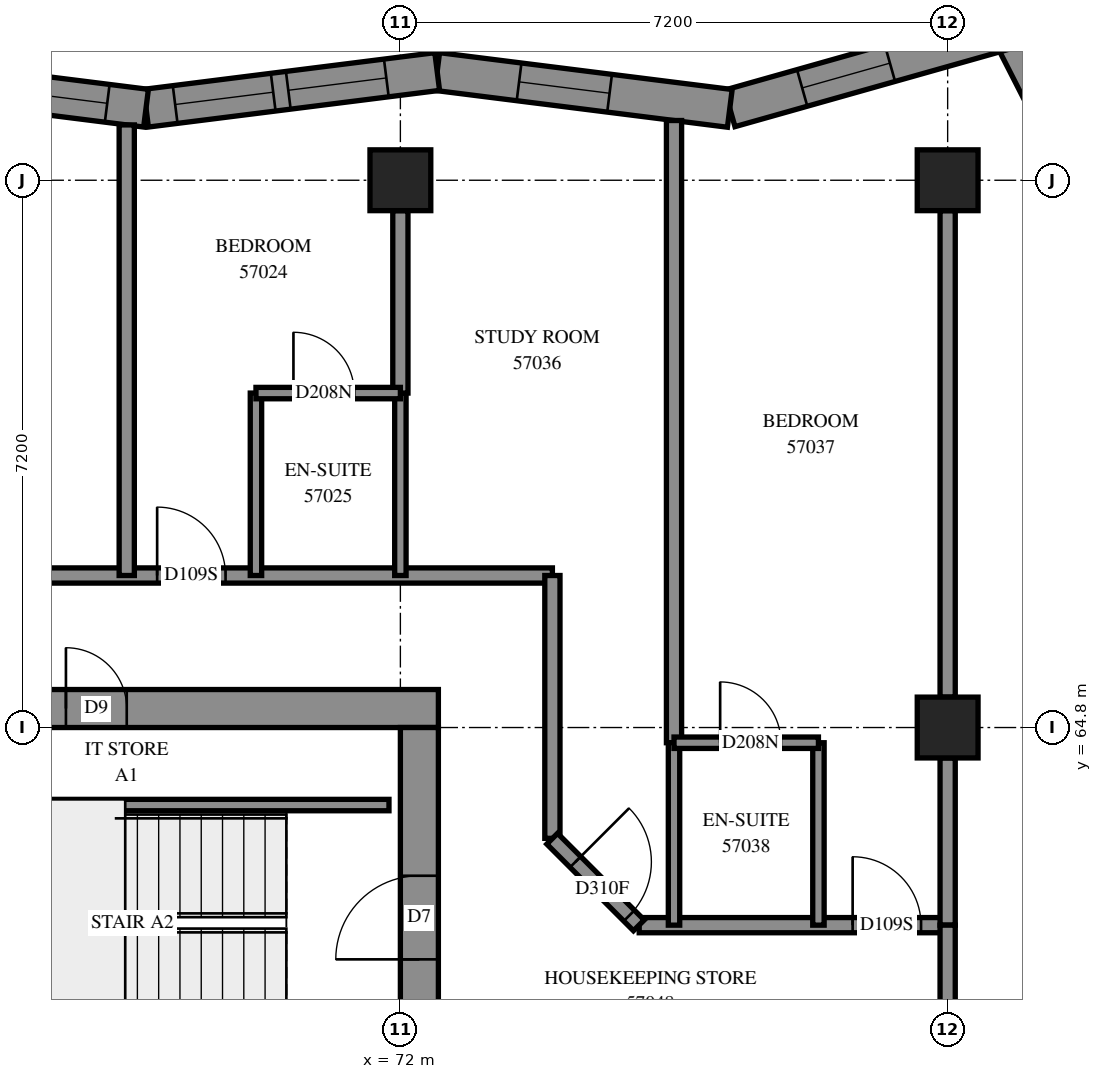
"""IFC4 building model, lengths in metres.
Left out: names, types, materials, properties, quantities, classifications, styles, units other than length and angle.
Written with IfcOpenShell. Run it as: python <this file> out.ifc"""

import sys

from ifc_helpers import new_model, si_unit, direction, frame, frame_2d, origin, origin_2d, place, context, subcontext, project, spatial, polyline, rectangle, outline, extrude, element, fill, save


model = new_model("IFC4")
c1 = context("Model", 3, precision=1e-05, world=origin(), true_north=direction((0.0, 1.0)))
c2 = subcontext(c1, "Body", "Model", "MODEL_VIEW")
j1 = project(units=[si_unit("LENGTHUNIT", "METRE"), si_unit("PLANEANGLEUNIT", "RADIAN")], contexts=[c1])
p1 = place(None, origin())
s1 = spatial("IfcSite", under=j1, at=p1, CompositionType="ELEMENT")
p2 = place(p1, origin())
s2 = spatial("IfcBuilding", under=s1, at=p2, CompositionType="ELEMENT")
p3 = place(p2, frame((0.0, 0.0, 210.0)))
s3 = spatial("IfcBuildingStorey", under=s2, at=p3, CompositionType="ELEMENT", Elevation=210.0)
for number, where, z_axis, x_axis in (
    (1, (72.0, 72.0, 0.0), (0.0, 0.0, 1.0), (1.0, 0.0, 0.0)),
    (2, (79.2, 64.8, 0.0), (0.0, 0.0, 1.0), (1.0, 0.0, 0.0)),
    (3, (79.2, 72.0, 0.0), (0.0, 0.0, 1.0), (1.0, 0.0, 0.0)),
):
    element("IfcColumn", number, at=place(p3, frame(where, z_axis=z_axis, x_axis=x_axis)), inside=s3, PredefinedType="COLUMN", context=c2, shape_type="SweptSolid", body=[
        extrude(rectangle(XDim=0.8, YDim=0.8, at=origin_2d()), origin(), (0.0, 0.0, 1.0), 3.1),
    ])
p4 = place(p3, frame((57.1, 65.05, -0.3), z_axis=(0.0, 0.0, 1.0), x_axis=(1.0, 0.0, 0.0)))
e4 = element("IfcWall", 4, at=p4, inside=s3, PredefinedType="SHEAR", context=c2, shape_type="SweptSolid", body=[
    extrude(rectangle(XDim=15.4, YDim=0.5, at=frame_2d((7.7, 0.0))), origin(), (0.0, 0.0, 1.0), 2.7),
])
p5 = place(p4, frame((10.5, 0.0, 0.3)))
e5 = element("IfcOpeningElement", 5, at=p5, cuts=e4, PredefinedType="OPENING", context=c2, shape_type="SweptSolid", body=[
    extrude(rectangle(XDim=0.8, YDim=2.1, at=frame_2d((0.4, 1.05))), frame((0.0, 0.26, 0.0), z_axis=(0.0, -1.0, 0.0), x_axis=(1.0, 0.0, 0.0)), (0.0, 0.0, 1.0), 0.52),
])
p6 = place(p3, frame((72.25, 50.4, -0.3), z_axis=(0.0, 0.0, 1.0), x_axis=(0.0, 1.0, 0.0)))
e6 = element("IfcWall", 6, at=p6, inside=s3, PredefinedType="SHEAR", context=c2, shape_type="SweptSolid", body=[
    extrude(rectangle(XDim=14.4, YDim=0.5, at=frame_2d((7.2, 0.0))), origin(), (0.0, 0.0, 1.0), 2.7),
])
p7 = place(p6, frame((4.55, 0.0, 0.3)))
e7 = element("IfcOpeningElement", 7, at=p7, cuts=e6, PredefinedType="OPENING", context=c2, shape_type="SweptSolid", body=[
    extrude(rectangle(XDim=1.1, YDim=2.1, at=frame_2d((0.55, 1.05))), frame((0.0, 0.26, 0.0), z_axis=(0.0, -1.0, 0.0), x_axis=(1.0, 0.0, 0.0)), (0.0, 0.0, 1.0), 0.52),
])
p8 = place(p6, frame((11.35, 0.0, 0.3)))
e8 = element("IfcOpeningElement", 8, at=p8, cuts=e6, PredefinedType="OPENING", context=c2, shape_type="SweptSolid", body=[
    extrude(rectangle(XDim=1.1, YDim=2.1, at=frame_2d((0.55, 1.05))), frame((0.0, 0.26, 0.0), z_axis=(0.0, -1.0, 0.0), x_axis=(1.0, 0.0, 0.0)), (0.0, 0.0, 1.0), 0.52),
])
p9 = place(p3, frame((81.542, 70.994, 0.0), z_axis=(0.0, 0.0, 1.0), x_axis=(-0.4543449851, 0.8908258161, 0.0)))
e9 = element("IfcWall", 9, at=p9, inside=s3, PredefinedType="SOLIDWALL", context=c2, shape_type="SweptSolid", body=[
    extrude(outline(polyline([(0.058, -0.25), (3.564, -0.25), (3.154, 0.25), (-0.058, 0.25), (0.058, -0.25)])), origin(), (0.0, 0.0, 1.0), 3.1),
])
p10 = place(p9, frame((0.745, 0.0, 0.45)))
e10 = element("IfcOpeningElement", 10, at=p10, cuts=e9, PredefinedType="OPENING", context=c2, shape_type="SweptSolid", body=[
    extrude(rectangle(XDim=1.2, YDim=2.5, at=frame_2d((0.6, 1.25))), frame((0.0, 0.26, 0.0), z_axis=(0.0, -1.0, 0.0), x_axis=(1.0, 0.0, 0.0)), (0.0, 0.0, 1.0), 0.52),
])
p11 = place(p3, frame((80.016, 73.986, 0.0), z_axis=(0.0, 0.0, 1.0), x_axis=(-0.9623461237, -0.2718270373, 0.0)))
e11 = element("IfcWall", 11, at=p11, inside=s3, PredefinedType="SOLIDWALL", context=c2, shape_type="SweptSolid", body=[
    extrude(outline(polyline([(-0.205, -0.25), (3.775, -0.25), (3.877, 0.25), (0.205, 0.25), (-0.205, -0.25)])), origin(), (0.0, 0.0, 1.0), 3.1),
])
p12 = place(p11, frame((1.637, 0.0, 0.45)))
e12 = element("IfcOpeningElement", 12, at=p12, cuts=e11, PredefinedType="OPENING", context=c2, shape_type="SweptSolid", body=[
    extrude(rectangle(XDim=1.2, YDim=2.5, at=frame_2d((0.6, 1.25))), frame((0.0, 0.26, 0.0), z_axis=(0.0, -1.0, 0.0), x_axis=(1.0, 0.0, 0.0)), (0.0, 0.0, 1.0), 0.52),
])
p13 = place(p3, frame((76.334, 72.946, 0.0), z_axis=(0.0, 0.0, 1.0), x_axis=(-0.9921764383, 0.1248435636, 0.0)))
e13 = element("IfcWall", 13, at=p13, inside=s3, PredefinedType="SOLIDWALL", context=c2, shape_type="SweptSolid", body=[
    extrude(outline(polyline([(0.051, -0.25), (3.912, -0.25), (3.849, 0.25), (-0.051, 0.25), (0.051, -0.25)])), origin(), (0.0, 0.0, 1.0), 3.1),
])
p14 = place(p13, frame((1.594, 0.0, 0.45)))
e14 = element("IfcOpeningElement", 14, at=p14, cuts=e13, PredefinedType="OPENING", context=c2, shape_type="SweptSolid", body=[
    extrude(rectangle(XDim=1.2, YDim=2.5, at=frame_2d((0.6, 1.25))), frame((0.0, 0.26, 0.0), z_axis=(0.0, -1.0, 0.0), x_axis=(1.0, 0.0, 0.0)), (0.0, 0.0, 1.0), 0.52),
])
p15 = place(p3, frame((72.484, 73.43, 0.0), z_axis=(0.0, 0.0, 1.0), x_axis=(-0.9921759282, -0.1248476171, 0.0)))
e15 = element("IfcWall", 15, at=p15, inside=s3, PredefinedType="SOLIDWALL", context=c2, shape_type="SweptSolid", body=[
    extrude(outline(polyline([(-0.032, -0.25), (3.829, -0.25), (3.892, 0.25), (0.032, 0.25), (-0.032, -0.25)])), origin(), (0.0, 0.0, 1.0), 3.1),
])
p16 = place(p15, frame((0.674, 0.0, 0.45)))
e16 = element("IfcOpeningElement", 16, at=p16, cuts=e15, PredefinedType="OPENING", context=c2, shape_type="SweptSolid", body=[
    extrude(rectangle(XDim=1.3, YDim=2.5, at=frame_2d((0.65, 1.25))), frame((0.0, 0.26, 0.0), z_axis=(0.0, -1.0, 0.0), x_axis=(1.0, 0.0, 0.0)), (0.0, 0.0, 1.0), 0.52),
])
p17 = place(p15, frame((2.174, 0.0, 0.45)))
e17 = element("IfcOpeningElement", 17, at=p17, cuts=e15, PredefinedType="OPENING", context=c2, shape_type="SweptSolid", body=[
    extrude(rectangle(XDim=1.3, YDim=2.5, at=frame_2d((0.65, 1.25))), frame((0.0, 0.26, 0.0), z_axis=(0.0, -1.0, 0.0), x_axis=(1.0, 0.0, 0.0)), (0.0, 0.0, 1.0), 0.52),
])
p18 = place(p3, frame((68.654, 72.948, 0.0), z_axis=(0.0, 0.0, 1.0), x_axis=(-0.9921759282, 0.1248476171, 0.0)))
e18 = element("IfcWall", 18, at=p18, inside=s3, PredefinedType="SOLIDWALL", context=c2, shape_type="SweptSolid", body=[
    extrude(outline(polyline([(0.032, -0.25), (3.892, -0.25), (3.829, 0.25), (-0.032, 0.25), (0.032, -0.25)])), origin(), (0.0, 0.0, 1.0), 3.1),
])
p19 = place(p18, frame((0.515, 0.0, 0.45)))
e19 = element("IfcOpeningElement", 19, at=p19, cuts=e18, PredefinedType="OPENING", context=c2, shape_type="SweptSolid", body=[
    extrude(rectangle(XDim=1.3, YDim=2.5, at=frame_2d((0.65, 1.25))), frame((0.0, 0.26, 0.0), z_axis=(0.0, -1.0, 0.0), x_axis=(1.0, 0.0, 0.0)), (0.0, 0.0, 1.0), 0.52),
])
p20 = place(p18, frame((2.015, 0.0, 0.45)))
e20 = element("IfcOpeningElement", 20, at=p20, cuts=e18, PredefinedType="OPENING", context=c2, shape_type="SweptSolid", body=[
    extrude(rectangle(XDim=1.3, YDim=2.5, at=frame_2d((0.65, 1.25))), frame((0.0, 0.26, 0.0), z_axis=(0.0, -1.0, 0.0), x_axis=(1.0, 0.0, 0.0)), (0.0, 0.0, 1.0), 0.52),
])
p21 = place(p3, frame((64.95, 63.78, 0.0), z_axis=(0.0, 0.0, 1.0), x_axis=(1.0, 0.0, 0.0)))
e21 = element("IfcWall", 21, at=p21, inside=s3, PredefinedType="PARTITIONING", context=c2, shape_type="SweptSolid", body=[
    extrude(rectangle(XDim=6.9, YDim=0.15, at=frame_2d((3.45, 0.0))), origin(), (0.0, 0.0, 1.0), 3.1),
])
p22 = place(p3, frame((55.6, 66.8, 0.0), z_axis=(0.0, 0.0, 1.0), x_axis=(1.0, 0.0, 0.0)))
e22 = element("IfcWall", 22, at=p22, inside=s3, PredefinedType="PARTITIONING", context=c2, shape_type="SweptSolid", body=[
    extrude(rectangle(XDim=18.4, YDim=0.2, at=frame_2d((9.2, 0.0))), origin(), (0.0, 0.0, 1.0), 3.1),
])
p23 = place(p22, frame((4.25, 0.0, 0.0)))
e23 = element("IfcOpeningElement", 23, at=p23, cuts=e22, PredefinedType="OPENING", context=c2, shape_type="SweptSolid", body=[
    extrude(rectangle(XDim=0.9, YDim=2.1, at=frame_2d((0.45, 1.05))), frame((0.0, 0.11, 0.0), z_axis=(0.0, -1.0, 0.0), x_axis=(1.0, 0.0, 0.0)), (0.0, 0.0, 1.0), 0.22),
])
p24 = place(p22, frame((7.974, 0.0, 0.0)))
e24 = element("IfcOpeningElement", 24, at=p24, cuts=e22, PredefinedType="OPENING", context=c2, shape_type="SweptSolid", body=[
    extrude(rectangle(XDim=1.0, YDim=2.1, at=frame_2d((0.5, 1.05))), frame((0.0, 0.11, 0.0), z_axis=(0.0, -1.0, 0.0), x_axis=(1.0, 0.0, 0.0)), (0.0, 0.0, 1.0), 0.22),
])
p25 = place(p22, frame((13.2, 0.0, 0.0)))
e25 = element("IfcOpeningElement", 25, at=p25, cuts=e22, PredefinedType="OPENING", context=c2, shape_type="SweptSolid", body=[
    extrude(rectangle(XDim=0.9, YDim=2.1, at=frame_2d((0.45, 1.05))), frame((0.0, 0.11, 0.0), z_axis=(0.0, -1.0, 0.0), x_axis=(1.0, 0.0, 0.0)), (0.0, 0.0, 1.0), 0.22),
])
p26 = place(p3, frame((75.6, 64.6, 0.0), z_axis=(0.0, 0.0, 1.0), x_axis=(0.0, 1.0, 0.0)))
e26 = element("IfcWall", 26, at=p26, inside=s3, PredefinedType="PARTITIONING", context=c2, shape_type="SweptSolid", body=[
    extrude(rectangle(XDim=8.186, YDim=0.2, at=frame_2d((4.093, 0.0))), origin(), (0.0, 0.0, 1.0), 3.1),
])
p27 = place(p3, frame((79.2, 65.2, 0.0), z_axis=(0.0, 0.0, 1.0), x_axis=(0.0, 1.0, 0.0)))
e27 = element("IfcWall", 27, at=p27, inside=s3, PredefinedType="PARTITIONING", context=c2, shape_type="SweptSolid", body=[
    extrude(rectangle(XDim=6.4, YDim=0.2, at=frame_2d((3.2, 0.0))), origin(), (0.0, 0.0, 1.0), 3.1),
])
p28 = place(p3, frame((68.4, 66.8, 0.0), z_axis=(0.0, 0.0, 1.0), x_axis=(0.0, 1.0, 0.0)))
e28 = element("IfcWall", 28, at=p28, inside=s3, PredefinedType="PARTITIONING", context=c2, shape_type="SweptSolid", body=[
    extrude(rectangle(XDim=5.928, YDim=0.2, at=frame_2d((2.964, 0.0))), origin(), (0.0, 0.0, 1.0), 3.1),
])
p29 = place(p3, frame((75.142, 62.2, 0.0), z_axis=(0.0, 0.0, 1.0), x_axis=(1.0, 0.0, 0.0)))
e29 = element("IfcWall", 29, at=p29, inside=s3, PredefinedType="PARTITIONING", context=c2, shape_type="SweptSolid", body=[
    extrude(rectangle(XDim=4.058, YDim=0.2, at=frame_2d((2.029, 0.0))), origin(), (0.0, 0.0, 1.0), 3.1),
])
p30 = place(p29, frame((2.808, 0.0, 0.0)))
e30 = element("IfcOpeningElement", 30, at=p30, cuts=e29, PredefinedType="OPENING", context=c2, shape_type="SweptSolid", body=[
    extrude(rectangle(XDim=0.9, YDim=2.1, at=frame_2d((0.45, 1.05))), frame((0.0, 0.11, 0.0), z_axis=(0.0, -1.0, 0.0), x_axis=(1.0, 0.0, 0.0)), (0.0, 0.0, 1.0), 0.22),
])
p31 = place(p3, frame((74.0, 63.342, 0.0), z_axis=(0.0, 0.0, 1.0), x_axis=(0.0, 1.0, 0.0)))
e31 = element("IfcWall", 31, at=p31, inside=s3, PredefinedType="PARTITIONING", context=c2, shape_type="SweptSolid", body=[
    extrude(rectangle(XDim=3.458, YDim=0.2, at=frame_2d((1.729, 0.0))), origin(), (0.0, 0.0, 1.0), 3.1),
])
for number, where, z_axis, x_axis in (
    (32, (70.1, 66.8, 0.0), (0.0, 0.0, 1.0), (0.0, 1.0, 0.0)),
    (33, (72.0, 66.8, 0.0), (0.0, 0.0, 1.0), (0.0, 1.0, 0.0)),
):
    element("IfcWall", number, at=place(p3, frame(where, z_axis=z_axis, x_axis=x_axis)), inside=s3, PredefinedType="PARTITIONING", context=c2, shape_type="SweptSolid", body=[
        extrude(rectangle(XDim=2.4, YDim=0.15, at=frame_2d((1.2, 0.0))), origin(), (0.0, 0.0, 1.0), 3.1),
    ])
p32 = place(p3, frame((72.0, 69.2, 0.0), z_axis=(0.0, 0.0, 1.0), x_axis=(0.0, 1.0, 0.0)))
e34 = element("IfcWall", 34, at=p32, inside=s3, PredefinedType="PARTITIONING", context=c2, shape_type="SweptSolid", body=[
    extrude(rectangle(XDim=2.4, YDim=0.2, at=frame_2d((1.2, 0.0))), origin(), (0.0, 0.0, 1.0), 3.1),
])
for number, where, z_axis, x_axis in (
    (35, (75.6, 62.2, 0.0), (0.0, 0.0, 1.0), (0.0, 1.0, 0.0)),
    (36, (77.5, 62.2, 0.0), (0.0, 0.0, 1.0), (0.0, 1.0, 0.0)),
):
    element("IfcWall", number, at=place(p3, frame(where, z_axis=z_axis, x_axis=x_axis)), inside=s3, PredefinedType="PARTITIONING", context=c2, shape_type="SweptSolid", body=[
        extrude(rectangle(XDim=2.4, YDim=0.15, at=frame_2d((1.2, 0.0))), origin(), (0.0, 0.0, 1.0), 3.1),
    ])
p33 = place(p3, frame((79.2, 62.2, 0.0), z_axis=(0.0, 0.0, 1.0), x_axis=(0.0, 1.0, 0.0)))
e37 = element("IfcWall", 37, at=p33, inside=s3, PredefinedType="PARTITIONING", context=c2, shape_type="SweptSolid", body=[
    extrude(rectangle(XDim=2.2, YDim=0.2, at=frame_2d((1.1, 0.0))), origin(), (0.0, 0.0, 1.0), 3.1),
])
p34 = place(p3, frame((79.2, 60.2, 0.0), z_axis=(0.0, 0.0, 1.0), x_axis=(0.0, 1.0, 0.0)))
e38 = element("IfcWall", 38, at=p34, inside=s3, PredefinedType="PARTITIONING", context=c2, shape_type="SweptSolid", body=[
    extrude(rectangle(XDim=2.0, YDim=0.2, at=frame_2d((1.0, 0.0))), origin(), (0.0, 0.0, 1.0), 3.1),
])
p35 = place(p3, frame((75.6, 64.6, 0.0), z_axis=(0.0, 0.0, 1.0), x_axis=(1.0, 0.0, 0.0)))
e39 = element("IfcWall", 39, at=p35, inside=s3, PredefinedType="PARTITIONING", context=c2, shape_type="SweptSolid", body=[
    extrude(rectangle(XDim=1.9, YDim=0.15, at=frame_2d((0.95, 0.0))), origin(), (0.0, 0.0, 1.0), 3.1),
])
p36 = place(p35, frame((0.607, 0.0, 0.0)))
e40 = element("IfcOpeningElement", 40, at=p36, cuts=e39, PredefinedType="OPENING", context=c2, shape_type="SweptSolid", body=[
    extrude(rectangle(XDim=0.8, YDim=2.1, at=frame_2d((0.4, 1.05))), frame((0.0, 0.085, 0.0), z_axis=(0.0, -1.0, 0.0), x_axis=(1.0, 0.0, 0.0)), (0.0, 0.0, 1.0), 0.17),
])
p37 = place(p3, frame((70.1, 69.2, 0.0), z_axis=(0.0, 0.0, 1.0), x_axis=(1.0, 0.0, 0.0)))
e41 = element("IfcWall", 41, at=p37, inside=s3, PredefinedType="PARTITIONING", context=c2, shape_type="SweptSolid", body=[
    extrude(rectangle(XDim=1.9, YDim=0.15, at=frame_2d((0.95, 0.0))), origin(), (0.0, 0.0, 1.0), 3.1),
])
p38 = place(p37, frame((0.493, 0.0, 0.0)))
e42 = element("IfcOpeningElement", 42, at=p38, cuts=e41, PredefinedType="OPENING", context=c2, shape_type="SweptSolid", body=[
    extrude(rectangle(XDim=0.8, YDim=2.1, at=frame_2d((0.4, 1.05))), frame((0.0, 0.085, 0.0), z_axis=(0.0, -1.0, 0.0), x_axis=(1.0, 0.0, 0.0)), (0.0, 0.0, 1.0), 0.17),
])
p39 = place(p3, frame((73.997, 63.337, 0.0), z_axis=(0.0, 0.0, 1.0), x_axis=(0.7071067812, -0.7071067812, 0.0)))
e43 = element("IfcWall", 43, at=p39, inside=s3, PredefinedType="PARTITIONING", context=c2, shape_type="SweptSolid", body=[
    extrude(rectangle(XDim=1.612, YDim=0.2, at=frame_2d((0.806, 0.0))), origin(), (0.0, 0.0, 1.0), 3.1),
])
p40 = place(p39, frame((0.432, 0.0, 0.0)))
e44 = element("IfcOpeningElement", 44, at=p40, cuts=e43, PredefinedType="OPENING", context=c2, shape_type="SweptSolid", body=[
    extrude(rectangle(XDim=1.0, YDim=2.1, at=frame_2d((0.5, 1.05))), frame((0.0, 0.11, 0.0), z_axis=(0.0, -1.0, 0.0), x_axis=(1.0, 0.0, 0.0)), (0.0, 0.0, 1.0), 0.22),
])
p41 = place(p12, origin())
e45 = element("IfcWindow", 45, at=p41, inside=s3, PartitioningType="SINGLE_PANEL", PredefinedType="WINDOW", context=c2, shape_type="SweptSolid", body=[
    extrude(rectangle(XDim=1.2, YDim=2.5, at=frame_2d((0.6, 1.25))), frame((0.0, 0.18, 0.0), z_axis=(0.0, -1.0, 0.0), x_axis=(1.0, 0.0, 0.0)), (0.0, 0.0, 1.0), 0.06),
])
fill(e12, e45)
p42 = place(p14, origin())
e46 = element("IfcWindow", 46, at=p42, inside=s3, PartitioningType="SINGLE_PANEL", PredefinedType="WINDOW", context=c2, shape_type="SweptSolid", body=[
    extrude(rectangle(XDim=1.2, YDim=2.5, at=frame_2d((0.6, 1.25))), frame((0.0, 0.18, 0.0), z_axis=(0.0, -1.0, 0.0), x_axis=(1.0, 0.0, 0.0)), (0.0, 0.0, 1.0), 0.06),
])
fill(e14, e46)
p43 = place(p16, origin())
e47 = element("IfcWindow", 47, at=p43, inside=s3, PartitioningType="SINGLE_PANEL", PredefinedType="WINDOW", context=c2, shape_type="SweptSolid", body=[
    extrude(rectangle(XDim=1.3, YDim=2.5, at=frame_2d((0.65, 1.25))), frame((0.0, 0.18, 0.0), z_axis=(0.0, -1.0, 0.0), x_axis=(1.0, 0.0, 0.0)), (0.0, 0.0, 1.0), 0.06),
])
fill(e16, e47)
p44 = place(p17, origin())
e48 = element("IfcWindow", 48, at=p44, inside=s3, PartitioningType="SINGLE_PANEL", PredefinedType="WINDOW", context=c2, shape_type="SweptSolid", body=[
    extrude(rectangle(XDim=1.3, YDim=2.5, at=frame_2d((0.65, 1.25))), frame((0.0, 0.18, 0.0), z_axis=(0.0, -1.0, 0.0), x_axis=(1.0, 0.0, 0.0)), (0.0, 0.0, 1.0), 0.06),
])
fill(e17, e48)
p45 = place(p19, origin())
e49 = element("IfcWindow", 49, at=p45, inside=s3, PartitioningType="SINGLE_PANEL", PredefinedType="WINDOW", context=c2, shape_type="SweptSolid", body=[
    extrude(rectangle(XDim=1.3, YDim=2.5, at=frame_2d((0.65, 1.25))), frame((0.0, 0.18, 0.0), z_axis=(0.0, -1.0, 0.0), x_axis=(1.0, 0.0, 0.0)), (0.0, 0.0, 1.0), 0.06),
])
fill(e19, e49)
p46 = place(p5, origin())
e50 = element("IfcDoor", 50, at=p46, inside=s3, OperationType="SINGLE_SWING_RIGHT", PredefinedType="DOOR", context=c2, shape_type="SweptSolid", body=[
    extrude(rectangle(XDim=0.8, YDim=2.1, at=frame_2d((0.4, 1.05))), frame((0.0, 0.025, 0.0), z_axis=(0.0, -1.0, 0.0), x_axis=(1.0, 0.0, 0.0)), (0.0, 0.0, 1.0), 0.05),
])
fill(e5, e50)
p47 = place(p8, origin())
e51 = element("IfcDoor", 51, at=p47, inside=s3, OperationType="SINGLE_SWING_RIGHT", PredefinedType="DOOR", context=c2, shape_type="SweptSolid", body=[
    extrude(rectangle(XDim=1.1, YDim=2.1, at=frame_2d((0.55, 1.05))), frame((0.0, 0.025, 0.0), z_axis=(0.0, -1.0, 0.0), x_axis=(1.0, 0.0, 0.0)), (0.0, 0.0, 1.0), 0.05),
])
fill(e8, e51)
p48 = place(p25, origin())
e52 = element("IfcDoor", 52, at=p48, inside=s3, OperationType="SINGLE_SWING_LEFT", PredefinedType="DOOR", context=c2, shape_type="SweptSolid", body=[
    extrude(rectangle(XDim=0.9, YDim=2.1, at=frame_2d((0.45, 1.05))), frame((0.0, 0.025, 0.0), z_axis=(0.0, -1.0, 0.0), x_axis=(1.0, 0.0, 0.0)), (0.0, 0.0, 1.0), 0.05),
])
fill(e25, e52)
p49 = place(p38, origin())
e53 = element("IfcDoor", 53, at=p49, inside=s3, OperationType="SINGLE_SWING_RIGHT", PredefinedType="DOOR", context=c2, shape_type="SweptSolid", body=[
    extrude(rectangle(XDim=0.8, YDim=2.1, at=frame_2d((0.4, 1.05))), frame((0.0, 0.025, 0.0), z_axis=(0.0, -1.0, 0.0), x_axis=(1.0, 0.0, 0.0)), (0.0, 0.0, 1.0), 0.05),
])
fill(e42, e53)
p50 = place(p40, origin())
e54 = element("IfcDoor", 54, at=p50, inside=s3, OperationType="SINGLE_SWING_RIGHT", PredefinedType="DOOR", context=c2, shape_type="SweptSolid", body=[
    extrude(rectangle(XDim=1.0, YDim=2.1, at=frame_2d((0.5, 1.05))), frame((0.0, 0.025, 0.0), z_axis=(0.0, -1.0, 0.0), x_axis=(1.0, 0.0, 0.0)), (0.0, 0.0, 1.0), 0.05),
])
fill(e44, e54)
p51 = place(p30, origin())
e55 = element("IfcDoor", 55, at=p51, inside=s3, OperationType="SINGLE_SWING_LEFT", PredefinedType="DOOR", context=c2, shape_type="SweptSolid", body=[
    extrude(rectangle(XDim=0.9, YDim=2.1, at=frame_2d((0.45, 1.05))), frame((0.0, 0.025, 0.0), z_axis=(0.0, -1.0, 0.0), x_axis=(1.0, 0.0, 0.0)), (0.0, 0.0, 1.0), 0.05),
])
fill(e30, e55)
p52 = place(p36, origin())
e56 = element("IfcDoor", 56, at=p52, inside=s3, OperationType="SINGLE_SWING_RIGHT", PredefinedType="DOOR", context=c2, shape_type="SweptSolid", body=[
    extrude(rectangle(XDim=0.8, YDim=2.1, at=frame_2d((0.4, 1.05))), frame((0.0, 0.025, 0.0), z_axis=(0.0, -1.0, 0.0), x_axis=(1.0, 0.0, 0.0)), (0.0, 0.0, 1.0), 0.05),
])
fill(e40, e56)
save(model, sys.argv[1])
